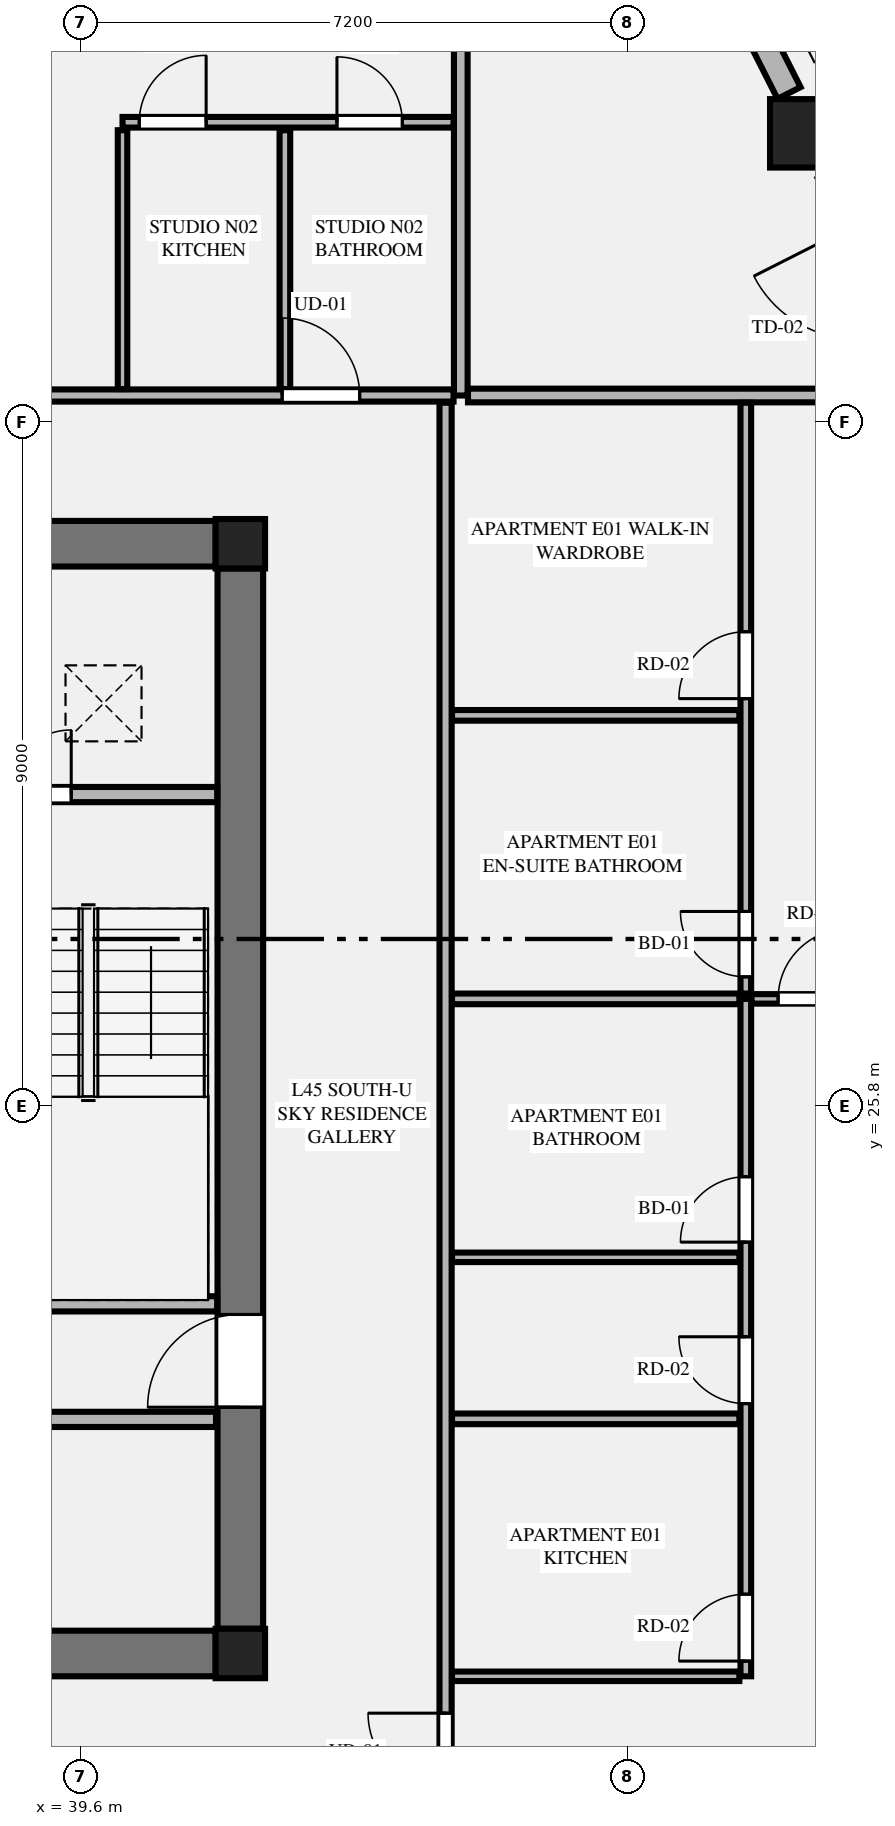
"""IFC4 building model, lengths in metres.
Left out: names, types, materials, properties, quantities, classifications, styles, units other than length and angle.
Written with IfcOpenShell. Run it as: python <this file> out.ifc"""

import sys

from ifc_helpers import new_model, si_unit, direction, frame, frame_2d, origin, origin_2d, place, context, subcontext, project, spatial, rectangle, extrude, element, fill, save


model = new_model("IFC4")
c1 = context("Model", 3, precision=1e-05, world=origin(), true_north=direction((0.0, 1.0)))
c2 = subcontext(c1, "Body", "Model", "MODEL_VIEW")
j1 = project(units=[si_unit("LENGTHUNIT", "METRE"), si_unit("PLANEANGLEUNIT", "RADIAN")], contexts=[c1])
p1 = place(None, origin())
s1 = spatial("IfcSite", under=j1, at=p1, CompositionType="ELEMENT")
p2 = place(p1, origin())
s2 = spatial("IfcBuilding", under=s1, at=p2, CompositionType="ELEMENT")
p3 = place(p2, frame((0.0, 0.0, 171.9)))
s3 = spatial("IfcBuildingStorey", under=s2, at=p3, CompositionType="ELEMENT", Elevation=171.9)
for number, where, z_axis, x_axis in (
    (1, (41.7, 18.6, 0.0), (0.0, 0.0, 1.0), (1.0, 0.0, 0.0)),
    (2, (41.7, 33.2, 0.0), (0.0, 0.0, 1.0), (1.0, 0.0, 0.0)),
):
    element("IfcColumn", number, at=place(p3, frame(where, z_axis=z_axis, x_axis=x_axis)), inside=s3, PredefinedType="COLUMN", context=c2, shape_type="SweptSolid", body=[
        extrude(rectangle(XDim=0.65, YDim=0.65, at=origin_2d()), origin(), (0.0, 0.0, 1.0), 3.55),
    ])
for number, where, z_axis, x_axis in (
    (3, (23.425, 18.6, 0.0), (0.0, 0.0, 1.0), (1.0, 0.0, 0.0)),
    (4, (23.425, 33.2, 0.0), (0.0, 0.0, 1.0), (1.0, 0.0, 0.0)),
):
    element("IfcWall", number, at=place(p3, frame(where, z_axis=z_axis, x_axis=x_axis)), inside=s3, PredefinedType="SHEAR", context=c2, shape_type="SweptSolid", body=[
        extrude(rectangle(XDim=17.95, YDim=0.6, at=frame_2d((8.975, 0.0))), origin(), (0.0, 0.0, 1.0), 3.35),
    ])
p4 = place(p3, frame((41.7, 18.925, 0.0), z_axis=(0.0, 0.0, 1.0), x_axis=(0.0, 1.0, 0.0)))
e5 = element("IfcWall", 5, at=p4, inside=s3, PredefinedType="SHEAR", context=c2, shape_type="SweptSolid", body=[
    extrude(rectangle(XDim=13.95, YDim=0.6, at=frame_2d((6.975, 0.0))), origin(), (0.0, 0.0, 1.0), 3.35),
])
p5 = place(p4, frame((2.915, 0.0, 0.0)))
e6 = element("IfcOpeningElement", 6, at=p5, cuts=e5, PredefinedType="OPENING", context=c2, shape_type="SweptSolid", body=[
    extrude(rectangle(XDim=1.22, YDim=2.25, at=frame_2d((0.61, 1.125))), frame((0.0, 0.31, 0.0), z_axis=(0.0, -1.0, 0.0), x_axis=(1.0, 0.0, 0.0)), (0.0, 0.0, 1.0), 0.62),
])
p6 = place(p3, frame((49.119, 38.599, 0.0), z_axis=(0.0, 0.0, 1.0), x_axis=(1.0, 0.0, 0.0)))
e7 = element("IfcColumn", 7, at=p6, inside=s3, PredefinedType="COLUMN", context=c2, shape_type="SweptSolid", body=[
    extrude(rectangle(XDim=0.9, YDim=0.9, at=origin_2d()), origin(), (0.0, 0.0, 1.0), 3.55),
])
p7 = place(p3, frame((38.125, 23.2, 0.0), z_axis=(0.0, 0.0, 1.0), x_axis=(1.0, 0.0, 0.0)))
e8 = element("IfcWall", 8, at=p7, inside=s3, PredefinedType="PLUMBINGWALL", context=c2, shape_type="SweptSolid", body=[
    extrude(rectangle(XDim=3.27, YDim=0.2, at=frame_2d((1.635, 0.0))), origin(), (0.0, 0.0, 1.0), 3.35),
])
p8 = place(p3, frame((38.125, 29.9, 0.0), z_axis=(0.0, 0.0, 1.0), x_axis=(1.0, 0.0, 0.0)))
e9 = element("IfcWall", 9, at=p8, inside=s3, PredefinedType="PLUMBINGWALL", context=c2, shape_type="SweptSolid", body=[
    extrude(rectangle(XDim=3.27, YDim=0.2, at=frame_2d((1.635, 0.0))), origin(), (0.0, 0.0, 1.0), 3.35),
])
p9 = place(p8, frame((0.5, 0.0, 0.0)))
e10 = element("IfcOpeningElement", 10, at=p9, cuts=e9, PredefinedType="OPENING", context=c2, shape_type="SweptSolid", body=[
    extrude(rectangle(XDim=0.85, YDim=2.05, at=frame_2d((0.425, 1.025))), frame((0.0, 0.11, 0.0), z_axis=(0.0, -1.0, 0.0), x_axis=(1.0, 0.0, 0.0)), (0.0, 0.0, 1.0), 0.22),
])
p10 = place(p3, frame((23.42, 21.68, 0.0), z_axis=(0.0, 0.0, 1.0), x_axis=(1.0, 0.0, 0.0)))
e11 = element("IfcWall", 11, at=p10, inside=s3, PredefinedType="PLUMBINGWALL", context=c2, shape_type="SweptSolid", body=[
    extrude(rectangle(XDim=17.96, YDim=0.2, at=frame_2d((8.98, 0.0))), origin(), (0.0, 0.0, 1.0), 3.35),
])
p11 = place(p10, frame((0.41, 0.0, 0.0)))
e12 = element("IfcOpeningElement", 12, at=p11, cuts=e11, PredefinedType="OPENING", context=c2, shape_type="SweptSolid", body=[
    extrude(rectangle(XDim=0.85, YDim=2.05, at=frame_2d((0.425, 1.025))), frame((0.0, 0.11, 0.0), z_axis=(0.0, -1.0, 0.0), x_axis=(1.0, 0.0, 0.0)), (0.0, 0.0, 1.0), 0.22),
])
p12 = place(p10, frame((6.03, 0.0, 0.0)))
e13 = element("IfcOpeningElement", 13, at=p12, cuts=e11, PredefinedType="OPENING", context=c2, shape_type="SweptSolid", body=[
    extrude(rectangle(XDim=0.85, YDim=2.05, at=frame_2d((0.425, 1.025))), frame((0.0, 0.11, 0.0), z_axis=(0.0, -1.0, 0.0), x_axis=(1.0, 0.0, 0.0)), (0.0, 0.0, 1.0), 0.22),
])
p13 = place(p10, frame((13.78, 0.0, 0.0)))
e14 = element("IfcOpeningElement", 14, at=p13, cuts=e11, PredefinedType="OPENING", context=c2, shape_type="SweptSolid", body=[
    extrude(rectangle(XDim=0.85, YDim=2.05, at=frame_2d((0.425, 1.025))), frame((0.0, 0.11, 0.0), z_axis=(0.0, -1.0, 0.0), x_axis=(1.0, 0.0, 0.0)), (0.0, 0.0, 1.0), 0.22),
])
p14 = place(p3, frame((48.919, 39.13, 0.0), z_axis=(0.0, 0.0, 1.0), x_axis=(-0.45150207307, 0.892270070109, 0.0)))
e15 = element("IfcWall", 15, at=p14, inside=s3, PredefinedType="STANDARD", context=c2, shape_type="SweptSolid", body=[
    extrude(rectangle(XDim=4.731, YDim=0.34, at=frame_2d((2.365, 0.0))), origin(), (0.0, 0.0, 1.0), 2.883),
])
p15 = place(p14, frame((1.74, 0.0, 0.75)))
e16 = element("IfcOpeningElement", 16, at=p15, cuts=e15, PredefinedType="OPENING", context=c2, shape_type="SweptSolid", body=[
    extrude(rectangle(XDim=1.25, YDim=1.95, at=frame_2d((0.625, 0.975))), frame((0.0, 0.18, 0.0), z_axis=(0.0, -1.0, 0.0), x_axis=(1.0, 0.0, 0.0)), (0.0, 0.0, 1.0), 0.36),
])
p16 = place(p3, frame((44.6, 35.15, 0.0), z_axis=(0.0, 0.0, 1.0), x_axis=(0.0, 1.0, 0.0)))
e17 = element("IfcWall", 17, at=p16, inside=s3, PredefinedType="PARTITIONING", context=c2, shape_type="SweptSolid", body=[
    extrude(rectangle(XDim=10.482, YDim=0.18, at=frame_2d((5.241, 0.0))), origin(), (0.0, 0.0, 1.0), 3.35),
])
p17 = place(p3, frame((36.038, 35.15, 0.0), z_axis=(0.0, 0.0, 1.0), x_axis=(1.0, 0.0, 0.0)))
e18 = element("IfcWall", 18, at=p17, inside=s3, PredefinedType="PARTITIONING", context=c2, shape_type="SweptSolid", body=[
    extrude(rectangle(XDim=8.467, YDim=0.16, at=frame_2d((4.233, 0.0))), origin(), (0.0, 0.0, 1.0), 3.35),
])
p18 = place(p17, frame((6.212, 0.0, 0.0)))
e19 = element("IfcOpeningElement", 19, at=p18, cuts=e18, PredefinedType="OPENING", context=c2, shape_type="SweptSolid", body=[
    extrude(rectangle(XDim=1.02, YDim=2.25, at=frame_2d((0.51, 1.125))), frame((0.0, 0.09, 0.0), z_axis=(0.0, -1.0, 0.0), x_axis=(1.0, 0.0, 0.0)), (0.0, 0.0, 1.0), 0.18),
])
p19 = place(p3, frame((40.15, 35.235, 0.0), z_axis=(0.0, 0.0, 1.0), x_axis=(0.0, 1.0, 0.0)))
e20 = element("IfcWall", 20, at=p19, inside=s3, PredefinedType="PARTITIONING", context=c2, shape_type="SweptSolid", body=[
    extrude(rectangle(XDim=3.405, YDim=0.125, at=frame_2d((1.702, 0.0))), origin(), (0.0, 0.0, 1.0), 3.35),
])
p20 = place(p3, frame((40.15, 38.745, 0.0), z_axis=(0.0, 0.0, 1.0), x_axis=(1.0, 0.0, 0.0)))
e21 = element("IfcWall", 21, at=p20, inside=s3, PredefinedType="PLUMBINGWALL", context=c2, shape_type="SweptSolid", body=[
    extrude(rectangle(XDim=4.355, YDim=0.14, at=frame_2d((2.177, 0.0))), origin(), (0.0, 0.0, 1.0), 3.35),
])
p21 = place(p20, frame((2.821, 0.0, 0.0)))
e22 = element("IfcOpeningElement", 22, at=p21, cuts=e21, PredefinedType="OPENING", context=c2, shape_type="SweptSolid", body=[
    extrude(rectangle(XDim=0.86, YDim=2.1, at=frame_2d((0.43, 1.05))), frame((0.0, 0.08, 0.0), z_axis=(0.0, -1.0, 0.0), x_axis=(1.0, 0.0, 0.0)), (0.0, 0.0, 1.0), 0.16),
])
p22 = place(p20, frame((0.22, 0.0, 0.0)))
e23 = element("IfcOpeningElement", 23, at=p22, cuts=e21, PredefinedType="OPENING", context=c2, shape_type="SweptSolid", body=[
    extrude(rectangle(XDim=0.88, YDim=2.15, at=frame_2d((0.44, 1.075))), frame((0.0, 0.08, 0.0), z_axis=(0.0, -1.0, 0.0), x_axis=(1.0, 0.0, 0.0)), (0.0, 0.0, 1.0), 0.16),
])
p23 = place(p3, frame((42.286, 35.235, 0.0), z_axis=(0.0, 0.0, 1.0), x_axis=(0.0, 1.0, 0.0)))
e24 = element("IfcWall", 24, at=p23, inside=s3, PredefinedType="PLUMBINGWALL", context=c2, shape_type="SweptSolid", body=[
    extrude(rectangle(XDim=3.405, YDim=0.14, at=frame_2d((1.702, 0.0))), origin(), (0.0, 0.0, 1.0), 2.807),
])
p24 = place(p3, frame((44.695, 35.15, 0.0), z_axis=(0.0, 0.0, 1.0), x_axis=(1.0, 0.0, 0.0)))
e25 = element("IfcWall", 25, at=p24, inside=s3, PredefinedType="PARTITIONING", context=c2, shape_type="SweptSolid", body=[
    extrude(rectangle(XDim=5.995, YDim=0.18, at=frame_2d((2.998, 0.0))), origin(), (0.0, 0.0, 1.0), 3.35),
])
p25 = place(p3, frame((44.4, 16.345, 0.0), z_axis=(0.0, 0.0, 1.0), x_axis=(0.0, 1.0, 0.0)))
e26 = element("IfcWall", 26, at=p25, inside=s3, PredefinedType="PARTITIONING", context=c2, shape_type="SweptSolid", body=[
    extrude(rectangle(XDim=18.71, YDim=0.16, at=frame_2d((9.355, 0.0))), origin(), (0.0, 0.0, 1.0), 3.35),
])
p26 = place(p25, frame((0.45, 0.0, 0.0)))
e27 = element("IfcOpeningElement", 27, at=p26, cuts=e26, PredefinedType="OPENING", context=c2, shape_type="SweptSolid", body=[
    extrude(rectangle(XDim=1.02, YDim=2.25, at=frame_2d((0.51, 1.125))), frame((0.0, 0.09, 0.0), z_axis=(0.0, -1.0, 0.0), x_axis=(1.0, 0.0, 0.0)), (0.0, 0.0, 1.0), 0.18),
])
p27 = place(p3, frame((44.485, 18.3, 0.0), z_axis=(0.0, 0.0, 1.0), x_axis=(1.0, 0.0, 0.0)))
e28 = element("IfcWall", 28, at=p27, inside=s3, PredefinedType="PARTITIONING", context=c2, shape_type="SweptSolid", body=[
    extrude(rectangle(XDim=3.78, YDim=0.125, at=frame_2d((1.89, 0.0))), origin(), (0.0, 0.0, 1.0), 2.807),
])
p28 = place(p3, frame((48.35, 18.3, 0.0), z_axis=(0.0, 0.0, 1.0), x_axis=(0.0, 1.0, 0.0)))
e29 = element("IfcWall", 29, at=p28, inside=s3, PredefinedType="PLUMBINGWALL", context=c2, shape_type="SweptSolid", body=[
    extrude(rectangle(XDim=8.912, YDim=0.14, at=frame_2d((4.456, 0.0))), origin(), (0.0, 0.0, 1.0), 3.35),
])
p29 = place(p28, frame((0.2, 0.0, 0.0)))
e30 = element("IfcOpeningElement", 30, at=p29, cuts=e29, PredefinedType="OPENING", context=c2, shape_type="SweptSolid", body=[
    extrude(rectangle(XDim=0.88, YDim=2.15, at=frame_2d((0.44, 1.075))), frame((0.0, 0.08, 0.0), z_axis=(0.0, -1.0, 0.0), x_axis=(1.0, 0.0, 0.0)), (0.0, 0.0, 1.0), 0.16),
])
p30 = place(p28, frame((3.587, 0.0, 0.0)))
e31 = element("IfcOpeningElement", 31, at=p30, cuts=e29, PredefinedType="OPENING", context=c2, shape_type="SweptSolid", body=[
    extrude(rectangle(XDim=0.88, YDim=2.15, at=frame_2d((0.44, 1.075))), frame((0.0, 0.08, 0.0), z_axis=(0.0, -1.0, 0.0), x_axis=(1.0, 0.0, 0.0)), (0.0, 0.0, 1.0), 0.16),
])
p31 = place(p28, frame((5.712, 0.0, 0.0)))
e32 = element("IfcOpeningElement", 32, at=p31, cuts=e29, PredefinedType="OPENING", context=c2, shape_type="SweptSolid", body=[
    extrude(rectangle(XDim=0.86, YDim=2.1, at=frame_2d((0.43, 1.05))), frame((0.0, 0.08, 0.0), z_axis=(0.0, -1.0, 0.0), x_axis=(1.0, 0.0, 0.0)), (0.0, 0.0, 1.0), 0.16),
])
p32 = place(p3, frame((48.35, 27.282, 0.0), z_axis=(0.0, 0.0, 1.0), x_axis=(0.0, 1.0, 0.0)))
e33 = element("IfcWall", 33, at=p32, inside=s3, PredefinedType="PLUMBINGWALL", context=c2, shape_type="SweptSolid", body=[
    extrude(rectangle(XDim=7.773, YDim=0.14, at=frame_2d((3.886, 0.0))), origin(), (0.0, 0.0, 1.0), 3.35),
])
p33 = place(p32, frame((0.22, 0.0, 0.0)))
e34 = element("IfcOpeningElement", 34, at=p33, cuts=e33, PredefinedType="OPENING", context=c2, shape_type="SweptSolid", body=[
    extrude(rectangle(XDim=0.86, YDim=2.1, at=frame_2d((0.43, 1.05))), frame((0.0, 0.08, 0.0), z_axis=(0.0, -1.0, 0.0), x_axis=(1.0, 0.0, 0.0)), (0.0, 0.0, 1.0), 0.16),
])
p34 = place(p32, frame((3.88, 0.0, 0.0)))
e35 = element("IfcOpeningElement", 35, at=p34, cuts=e33, PredefinedType="OPENING", context=c2, shape_type="SweptSolid", body=[
    extrude(rectangle(XDim=0.88, YDim=2.15, at=frame_2d((0.44, 1.075))), frame((0.0, 0.08, 0.0), z_axis=(0.0, -1.0, 0.0), x_axis=(1.0, 0.0, 0.0)), (0.0, 0.0, 1.0), 0.16),
])
p35 = place(p3, frame((44.485, 27.212, 0.0), z_axis=(0.0, 0.0, 1.0), x_axis=(1.0, 0.0, 0.0)))
e36 = element("IfcWall", 36, at=p35, inside=s3, PredefinedType="PLUMBINGWALL", context=c2, shape_type="SweptSolid", body=[
    extrude(rectangle(XDim=3.78, YDim=0.14, at=frame_2d((1.89, 0.0))), origin(), (0.0, 0.0, 1.0), 3.35),
])
p36 = place(p3, frame((48.425, 27.212, 0.0), z_axis=(0.0, 0.0, 1.0), x_axis=(1.0, 0.0, 0.0)))
e37 = element("IfcWall", 37, at=p36, inside=s3, PredefinedType="PARTITIONING", context=c2, shape_type="SweptSolid", body=[
    extrude(rectangle(XDim=6.296, YDim=0.125, at=frame_2d((3.148, 0.0))), origin(), (0.0, 0.0, 1.0), 3.35),
])
p37 = place(p36, frame((0.35, 0.0, 0.0)))
e38 = element("IfcOpeningElement", 38, at=p37, cuts=e37, PredefinedType="OPENING", context=c2, shape_type="SweptSolid", body=[
    extrude(rectangle(XDim=0.92, YDim=2.15, at=frame_2d((0.46, 1.075))), frame((0.0, 0.073, 0.0), z_axis=(0.0, -1.0, 0.0), x_axis=(1.0, 0.0, 0.0)), (0.0, 0.0, 1.0), 0.145),
])
p38 = place(p3, frame((44.485, 21.687, 0.0), z_axis=(0.0, 0.0, 1.0), x_axis=(1.0, 0.0, 0.0)))
e39 = element("IfcWall", 39, at=p38, inside=s3, PredefinedType="PLUMBINGWALL", context=c2, shape_type="SweptSolid", body=[
    extrude(rectangle(XDim=3.78, YDim=0.14, at=frame_2d((1.89, 0.0))), origin(), (0.0, 0.0, 1.0), 3.35),
])
p39 = place(p3, frame((44.485, 23.812, 0.0), z_axis=(0.0, 0.0, 1.0), x_axis=(1.0, 0.0, 0.0)))
e40 = element("IfcWall", 40, at=p39, inside=s3, PredefinedType="PARTITIONING", context=c2, shape_type="SweptSolid", body=[
    extrude(rectangle(XDim=3.78, YDim=0.125, at=frame_2d((1.89, 0.0))), origin(), (0.0, 0.0, 1.0), 3.35),
])
p40 = place(p3, frame((44.485, 30.942, 0.0), z_axis=(0.0, 0.0, 1.0), x_axis=(1.0, 0.0, 0.0)))
e41 = element("IfcWall", 41, at=p40, inside=s3, PredefinedType="PLUMBINGWALL", context=c2, shape_type="SweptSolid", body=[
    extrude(rectangle(XDim=3.78, YDim=0.14, at=frame_2d((1.89, 0.0))), origin(), (0.0, 0.0, 1.0), 3.35),
])
p41 = place(p5, origin())
e42 = element("IfcDoor", 42, at=p41, inside=s3, OperationType="SINGLE_SWING_LEFT", PredefinedType="DOOR", context=c2, shape_type="SweptSolid", body=[
    extrude(rectangle(XDim=1.22, YDim=2.25, at=frame_2d((0.61, 1.125))), frame((0.0, 0.025, 0.0), z_axis=(0.0, -1.0, 0.0), x_axis=(1.0, 0.0, 0.0)), (0.0, 0.0, 1.0), 0.05),
])
fill(e6, e42)
p42 = place(p9, origin())
e43 = element("IfcDoor", 43, at=p42, inside=s3, OperationType="SINGLE_SWING_RIGHT", PredefinedType="DOOR", context=c2, shape_type="SweptSolid", body=[
    extrude(rectangle(XDim=0.85, YDim=2.05, at=frame_2d((0.425, 1.025))), frame((0.0, 0.025, 0.0), z_axis=(0.0, -1.0, 0.0), x_axis=(1.0, 0.0, 0.0)), (0.0, 0.0, 1.0), 0.05),
])
fill(e10, e43)
p43 = place(p21, origin())
e44 = element("IfcDoor", 44, at=p43, inside=s3, OperationType="SINGLE_SWING_LEFT", PredefinedType="DOOR", context=c2, shape_type="SweptSolid", body=[
    extrude(rectangle(XDim=0.86, YDim=2.1, at=frame_2d((0.43, 1.05))), frame((0.0, 0.025, 0.0), z_axis=(0.0, -1.0, 0.0), x_axis=(1.0, 0.0, 0.0)), (0.0, 0.0, 1.0), 0.05),
])
fill(e22, e44)
p44 = place(p18, origin())
e45 = element("IfcDoor", 45, at=p44, inside=s3, OperationType="SINGLE_SWING_LEFT", PredefinedType="DOOR", context=c2, shape_type="SweptSolid", body=[
    extrude(rectangle(XDim=1.02, YDim=2.25, at=frame_2d((0.51, 1.125))), frame((0.0, 0.025, 0.0), z_axis=(0.0, -1.0, 0.0), x_axis=(1.0, 0.0, 0.0)), (0.0, 0.0, 1.0), 0.05),
])
fill(e19, e45)
p45 = place(p22, origin())
e46 = element("IfcDoor", 46, at=p45, inside=s3, OperationType="SINGLE_SWING_RIGHT", PredefinedType="DOOR", context=c2, shape_type="SweptSolid", body=[
    extrude(rectangle(XDim=0.88, YDim=2.15, at=frame_2d((0.44, 1.075))), frame((0.0, 0.025, 0.0), z_axis=(0.0, -1.0, 0.0), x_axis=(1.0, 0.0, 0.0)), (0.0, 0.0, 1.0), 0.05),
])
fill(e23, e46)
p46 = place(p29, origin())
e47 = element("IfcDoor", 47, at=p46, inside=s3, OperationType="SINGLE_SWING_LEFT", PredefinedType="DOOR", context=c2, shape_type="SweptSolid", body=[
    extrude(rectangle(XDim=0.88, YDim=2.15, at=frame_2d((0.44, 1.075))), frame((0.0, 0.025, 0.0), z_axis=(0.0, -1.0, 0.0), x_axis=(1.0, 0.0, 0.0)), (0.0, 0.0, 1.0), 0.05),
])
fill(e30, e47)
p47 = place(p30, origin())
e48 = element("IfcDoor", 48, at=p47, inside=s3, OperationType="SINGLE_SWING_RIGHT", PredefinedType="DOOR", context=c2, shape_type="SweptSolid", body=[
    extrude(rectangle(XDim=0.88, YDim=2.15, at=frame_2d((0.44, 1.075))), frame((0.0, 0.025, 0.0), z_axis=(0.0, -1.0, 0.0), x_axis=(1.0, 0.0, 0.0)), (0.0, 0.0, 1.0), 0.05),
])
fill(e31, e48)
p48 = place(p31, origin())
e49 = element("IfcDoor", 49, at=p48, inside=s3, OperationType="SINGLE_SWING_LEFT", PredefinedType="DOOR", context=c2, shape_type="SweptSolid", body=[
    extrude(rectangle(XDim=0.86, YDim=2.1, at=frame_2d((0.43, 1.05))), frame((0.0, 0.025, 0.0), z_axis=(0.0, -1.0, 0.0), x_axis=(1.0, 0.0, 0.0)), (0.0, 0.0, 1.0), 0.05),
])
fill(e32, e49)
p49 = place(p33, origin())
e50 = element("IfcDoor", 50, at=p49, inside=s3, OperationType="SINGLE_SWING_RIGHT", PredefinedType="DOOR", context=c2, shape_type="SweptSolid", body=[
    extrude(rectangle(XDim=0.86, YDim=2.1, at=frame_2d((0.43, 1.05))), frame((0.0, 0.025, 0.0), z_axis=(0.0, -1.0, 0.0), x_axis=(1.0, 0.0, 0.0)), (0.0, 0.0, 1.0), 0.05),
])
fill(e34, e50)
p50 = place(p34, origin())
e51 = element("IfcDoor", 51, at=p50, inside=s3, OperationType="SINGLE_SWING_LEFT", PredefinedType="DOOR", context=c2, shape_type="SweptSolid", body=[
    extrude(rectangle(XDim=0.88, YDim=2.15, at=frame_2d((0.44, 1.075))), frame((0.0, 0.025, 0.0), z_axis=(0.0, -1.0, 0.0), x_axis=(1.0, 0.0, 0.0)), (0.0, 0.0, 1.0), 0.05),
])
fill(e35, e51)
p51 = place(p26, origin())
e52 = element("IfcDoor", 52, at=p51, inside=s3, OperationType="SINGLE_SWING_RIGHT", PredefinedType="DOOR", context=c2, shape_type="SweptSolid", body=[
    extrude(rectangle(XDim=1.02, YDim=2.25, at=frame_2d((0.51, 1.125))), frame((0.0, 0.025, 0.0), z_axis=(0.0, -1.0, 0.0), x_axis=(1.0, 0.0, 0.0)), (0.0, 0.0, 1.0), 0.05),
])
fill(e27, e52)
p52 = place(p37, origin())
e53 = element("IfcDoor", 53, at=p52, inside=s3, OperationType="SINGLE_SWING_RIGHT", PredefinedType="DOOR", context=c2, shape_type="SweptSolid", body=[
    extrude(rectangle(XDim=0.92, YDim=2.15, at=frame_2d((0.46, 1.075))), frame((0.0, 0.025, 0.0), z_axis=(0.0, -1.0, 0.0), x_axis=(1.0, 0.0, 0.0)), (0.0, 0.0, 1.0), 0.05),
])
fill(e38, e53)
save(model, sys.argv[1])
